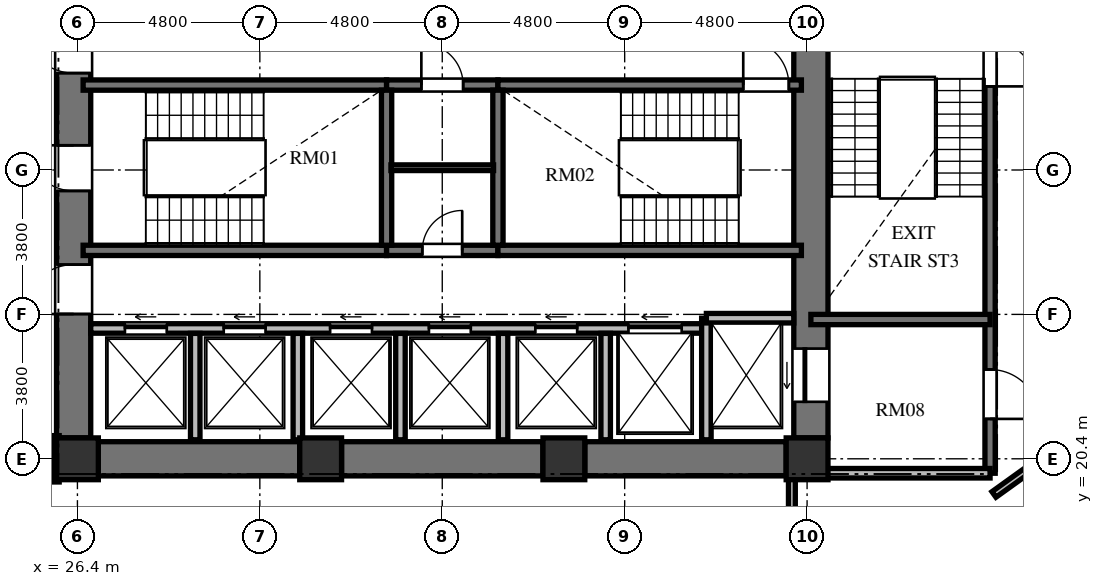
"""IFC4 building model, lengths in metres.
Left out: names, types, materials, properties, quantities, classifications, styles, units other than length and angle.
Written with IfcOpenShell. Run it as: python <this file> out.ifc"""

import sys

from ifc_helpers import new_model, si_unit, direction, frame, frame_2d, origin, origin_2d, place, context, subcontext, project, spatial, rectangle, extrude, element, fill, save


model = new_model("IFC4")
c1 = context("Model", 3, precision=1e-05, world=origin(), true_north=direction((0.0, 1.0)))
c2 = subcontext(c1, "Body", "Model", "MODEL_VIEW")
j1 = project(units=[si_unit("LENGTHUNIT", "METRE"), si_unit("PLANEANGLEUNIT", "RADIAN")], contexts=[c1])
p1 = place(None, origin())
s1 = spatial("IfcSite", under=j1, at=p1, CompositionType="ELEMENT")
p2 = place(p1, origin())
s2 = spatial("IfcBuilding", under=s1, at=p2, CompositionType="ELEMENT")
p3 = place(p2, frame((0.0, 0.0, 58.032)))
s3 = spatial("IfcBuildingStorey", under=s2, at=p3, CompositionType="ELEMENT", Elevation=58.032)
for number, where, z_axis, x_axis in (
    (1, (26.4, 20.4, 0.0), (0.0, 0.0, 1.0), (1.0, 0.0, 0.0)),
    (2, (32.8, 20.4, 0.0), (0.0, 0.0, 1.0), (1.0, 0.0, 0.0)),
    (3, (39.2, 20.4, 0.0), (0.0, 0.0, 1.0), (1.0, 0.0, 0.0)),
    (4, (45.6, 20.4, 0.0), (0.0, 0.0, 1.0), (1.0, 0.0, 0.0)),
):
    element("IfcColumn", number, at=place(p3, frame(where, z_axis=z_axis, x_axis=x_axis)), inside=s3, PredefinedType="COLUMN", context=c2, shape_type="SweptSolid", body=[
        extrude(rectangle(XDim=1.1, YDim=1.1, at=origin_2d()), origin(), (0.0, 0.0, 1.0), 3.648),
    ])
p4 = place(p3, frame((26.3, 20.95, 0.0), z_axis=(0.0, 0.0, 1.0), x_axis=(0.0, 1.0, 0.0)))
e5 = element("IfcWall", 5, at=p4, inside=s3, PredefinedType="SHEAR", context=c2, shape_type="SweptSolid", body=[
    extrude(rectangle(XDim=14.1, YDim=0.9, at=frame_2d((7.05, 0.0))), origin(), (0.0, 0.0, 1.0), 3.648),
])
p5 = place(p4, frame((6.5, 0.0, 0.0)))
e6 = element("IfcOpeningElement", 6, at=p5, cuts=e5, PredefinedType="OPENING", context=c2, shape_type="SweptSolid", body=[
    extrude(rectangle(XDim=1.2, YDim=2.15, at=frame_2d((0.6, 1.075))), frame((0.0, 0.46, 0.0), z_axis=(0.0, -1.0, 0.0), x_axis=(1.0, 0.0, 0.0)), (0.0, 0.0, 1.0), 0.92),
])
p6 = place(p4, frame((9.6, 0.0, 0.0)))
e7 = element("IfcOpeningElement", 7, at=p6, cuts=e5, PredefinedType="OPENING", context=c2, shape_type="SweptSolid", body=[
    extrude(rectangle(XDim=1.3, YDim=2.2, at=frame_2d((0.65, 1.1))), frame((0.0, 0.46, 0.0), z_axis=(0.0, -1.0, 0.0), x_axis=(1.0, 0.0, 0.0)), (0.0, 0.0, 1.0), 0.92),
])
p7 = place(p4, frame((3.26, 0.0, 0.0)))
e8 = element("IfcOpeningElement", 8, at=p7, cuts=e5, PredefinedType="OPENING", context=c2, shape_type="SweptSolid", body=[
    extrude(rectangle(XDim=1.3, YDim=2.2, at=frame_2d((0.65, 1.1))), frame((0.0, 0.46, 0.0), z_axis=(0.0, -1.0, 0.0), x_axis=(1.0, 0.0, 0.0)), (0.0, 0.0, 1.0), 0.92),
])
p8 = place(p3, frame((45.7, 20.95, 0.0), z_axis=(0.0, 0.0, 1.0), x_axis=(0.0, 1.0, 0.0)))
e9 = element("IfcWall", 9, at=p8, inside=s3, PredefinedType="SHEAR", context=c2, shape_type="SweptSolid", body=[
    extrude(rectangle(XDim=14.1, YDim=0.9, at=frame_2d((7.05, 0.0))), origin(), (0.0, 0.0, 1.0), 3.648),
])
p9 = place(p8, frame((11.75, 0.0, 0.0)))
e10 = element("IfcOpeningElement", 10, at=p9, cuts=e9, PredefinedType="OPENING", context=c2, shape_type="SweptSolid", body=[
    extrude(rectangle(XDim=1.4, YDim=2.3, at=frame_2d((0.7, 1.15))), frame((0.0, 0.46, 0.0), z_axis=(0.0, -1.0, 0.0), x_axis=(1.0, 0.0, 0.0)), (0.0, 0.0, 1.0), 0.92),
])
p10 = place(p8, frame((0.95, 0.0, 0.0)))
e11 = element("IfcOpeningElement", 11, at=p10, cuts=e9, PredefinedType="OPENING", context=c2, shape_type="SweptSolid", body=[
    extrude(rectangle(XDim=1.4, YDim=2.3, at=frame_2d((0.7, 1.15))), frame((0.0, 0.46, 0.0), z_axis=(0.0, -1.0, 0.0), x_axis=(1.0, 0.0, 0.0)), (0.0, 0.0, 1.0), 0.92),
])
p11 = place(p3, frame((26.95, 20.4, 0.0), z_axis=(0.0, 0.0, 1.0), x_axis=(1.0, 0.0, 0.0)))
e12 = element("IfcWall", 12, at=p11, inside=s3, PredefinedType="SHEAR", context=c2, shape_type="SweptSolid", body=[
    extrude(rectangle(XDim=5.3, YDim=0.9, at=frame_2d((2.65, 0.0))), origin(), (0.0, 0.0, 1.0), 3.648),
])
p12 = place(p3, frame((33.35, 20.4, 0.0), z_axis=(0.0, 0.0, 1.0), x_axis=(1.0, 0.0, 0.0)))
e13 = element("IfcWall", 13, at=p12, inside=s3, PredefinedType="SHEAR", context=c2, shape_type="SweptSolid", body=[
    extrude(rectangle(XDim=5.3, YDim=0.9, at=frame_2d((2.65, 0.0))), origin(), (0.0, 0.0, 1.0), 3.648),
])
p13 = place(p3, frame((39.75, 20.4, 0.0), z_axis=(0.0, 0.0, 1.0), x_axis=(1.0, 0.0, 0.0)))
e14 = element("IfcWall", 14, at=p13, inside=s3, PredefinedType="SHEAR", context=c2, shape_type="SweptSolid", body=[
    extrude(rectangle(XDim=5.3, YDim=0.9, at=frame_2d((2.65, 0.0))), origin(), (0.0, 0.0, 1.0), 3.648),
])
p14 = place(p3, frame((26.55, 30.235, 0.0), z_axis=(0.0, 0.0, 1.0), x_axis=(1.0, 0.0, 0.0)))
e15 = element("IfcWall", 15, at=p14, inside=s3, PredefinedType="SHEAR", context=c2, shape_type="SweptSolid", body=[
    extrude(rectangle(XDim=7.985, YDim=0.27, at=frame_2d((3.992, 0.0))), origin(), (0.0, 0.0, 1.0), 3.648),
])
p15 = place(p3, frame((34.535, 30.235, 0.0), z_axis=(0.0, 0.0, 1.0), x_axis=(1.0, 0.0, 0.0)))
e16 = element("IfcWall", 16, at=p15, inside=s3, PredefinedType="SHEAR", context=c2, shape_type="SweptSolid", body=[
    extrude(rectangle(XDim=2.93, YDim=0.27, at=frame_2d((1.465, 0.0))), origin(), (0.0, 0.0, 1.0), 3.648),
])
p16 = place(p15, frame((0.915, 0.0, 0.0)))
e17 = element("IfcOpeningElement", 17, at=p16, cuts=e16, PredefinedType="OPENING", context=c2, shape_type="SweptSolid", body=[
    extrude(rectangle(XDim=1.1, YDim=2.15, at=frame_2d((0.55, 1.075))), frame((0.0, 0.145, 0.0), z_axis=(0.0, -1.0, 0.0), x_axis=(1.0, 0.0, 0.0)), (0.0, 0.0, 1.0), 0.29),
])
p17 = place(p3, frame((37.465, 30.235, 0.0), z_axis=(0.0, 0.0, 1.0), x_axis=(1.0, 0.0, 0.0)))
e18 = element("IfcWall", 18, at=p17, inside=s3, PredefinedType="SHEAR", context=c2, shape_type="SweptSolid", body=[
    extrude(rectangle(XDim=7.985, YDim=0.27, at=frame_2d((3.992, 0.0))), origin(), (0.0, 0.0, 1.0), 3.648),
])
p18 = place(p17, frame((6.455, 0.0, 0.0)))
e19 = element("IfcOpeningElement", 19, at=p18, cuts=e18, PredefinedType="OPENING", context=c2, shape_type="SweptSolid", body=[
    extrude(rectangle(XDim=1.2, YDim=2.15, at=frame_2d((0.6, 1.075))), frame((0.0, 0.145, 0.0), z_axis=(0.0, -1.0, 0.0), x_axis=(1.0, 0.0, 0.0)), (0.0, 0.0, 1.0), 0.29),
])
p19 = place(p3, frame((26.55, 25.885, 0.0), z_axis=(0.0, 0.0, 1.0), x_axis=(1.0, 0.0, 0.0)))
e20 = element("IfcWall", 20, at=p19, inside=s3, PredefinedType="SHEAR", context=c2, shape_type="SweptSolid", body=[
    extrude(rectangle(XDim=7.985, YDim=0.27, at=frame_2d((3.992, 0.0))), origin(), (0.0, 0.0, 1.0), 3.648),
])
p20 = place(p3, frame((34.535, 25.885, 0.0), z_axis=(0.0, 0.0, 1.0), x_axis=(1.0, 0.0, 0.0)))
e21 = element("IfcWall", 21, at=p20, inside=s3, PredefinedType="SHEAR", context=c2, shape_type="SweptSolid", body=[
    extrude(rectangle(XDim=2.93, YDim=0.27, at=frame_2d((1.465, 0.0))), origin(), (0.0, 0.0, 1.0), 3.648),
])
p21 = place(p20, frame((0.94, 0.0, 0.0)))
e22 = element("IfcOpeningElement", 22, at=p21, cuts=e21, PredefinedType="OPENING", context=c2, shape_type="SweptSolid", body=[
    extrude(rectangle(XDim=1.05, YDim=2.15, at=frame_2d((0.525, 1.075))), frame((0.0, 0.145, 0.0), z_axis=(0.0, -1.0, 0.0), x_axis=(1.0, 0.0, 0.0)), (0.0, 0.0, 1.0), 0.29),
])
p22 = place(p3, frame((37.465, 25.885, 0.0), z_axis=(0.0, 0.0, 1.0), x_axis=(1.0, 0.0, 0.0)))
e23 = element("IfcWall", 23, at=p22, inside=s3, PredefinedType="SHEAR", context=c2, shape_type="SweptSolid", body=[
    extrude(rectangle(XDim=7.985, YDim=0.27, at=frame_2d((3.992, 0.0))), origin(), (0.0, 0.0, 1.0), 3.648),
])
for number, where, z_axis, x_axis in (
    (24, (34.535, 26.02, 0.0), (0.0, 0.0, 1.0), (0.0, 1.0, 0.0)),
    (25, (37.465, 26.02, 0.0), (0.0, 0.0, 1.0), (0.0, 1.0, 0.0)),
):
    element("IfcWall", number, at=place(p3, frame(where, z_axis=z_axis, x_axis=x_axis)), inside=s3, PredefinedType="SHEAR", context=c2, shape_type="SweptSolid", body=[
        extrude(rectangle(XDim=4.08, YDim=0.27, at=frame_2d((2.04, 0.0))), origin(), (0.0, 0.0, 1.0), 3.648),
    ])
p23 = place(p3, frame((34.65, 28.06, 0.0), z_axis=(0.0, 0.0, 1.0), x_axis=(1.0, 0.0, 0.0)))
e26 = element("IfcWall", 26, at=p23, inside=s3, PredefinedType="PARTITIONING", context=c2, shape_type="SweptSolid", body=[
    extrude(rectangle(XDim=2.7, YDim=0.15, at=frame_2d((1.35, 0.0))), origin(), (0.0, 0.0, 1.0), 3.428),
])
p24 = place(p3, frame((26.75, 23.83, 0.0), z_axis=(0.0, 0.0, 1.0), x_axis=(1.0, 0.0, 0.0)))
e27 = element("IfcWall", 27, at=p24, inside=s3, PredefinedType="SOLIDWALL", context=c2, shape_type="SweptSolid", body=[
    extrude(rectangle(XDim=16.2, YDim=0.25, at=frame_2d((8.1, 0.0))), origin(), (0.0, 0.0, 1.0), 3.428),
])
p25 = place(p24, frame((0.9, 0.0, 0.0)))
e28 = element("IfcOpeningElement", 28, at=p25, cuts=e27, PredefinedType="OPENING", context=c2, shape_type="SweptSolid", body=[
    extrude(rectangle(XDim=1.1, YDim=2.2, at=frame_2d((0.55, 1.1))), frame((0.0, 0.135, 0.0), z_axis=(0.0, -1.0, 0.0), x_axis=(1.0, 0.0, 0.0)), (0.0, 0.0, 1.0), 0.27),
])
p26 = place(p24, frame((3.5, 0.0, 0.0)))
e29 = element("IfcOpeningElement", 29, at=p26, cuts=e27, PredefinedType="OPENING", context=c2, shape_type="SweptSolid", body=[
    extrude(rectangle(XDim=1.1, YDim=2.2, at=frame_2d((0.55, 1.1))), frame((0.0, 0.135, 0.0), z_axis=(0.0, -1.0, 0.0), x_axis=(1.0, 0.0, 0.0)), (0.0, 0.0, 1.0), 0.27),
])
p27 = place(p24, frame((6.3, 0.0, 0.0)))
e30 = element("IfcOpeningElement", 30, at=p27, cuts=e27, PredefinedType="OPENING", context=c2, shape_type="SweptSolid", body=[
    extrude(rectangle(XDim=1.1, YDim=2.2, at=frame_2d((0.55, 1.1))), frame((0.0, 0.135, 0.0), z_axis=(0.0, -1.0, 0.0), x_axis=(1.0, 0.0, 0.0)), (0.0, 0.0, 1.0), 0.27),
])
p28 = place(p24, frame((8.9, 0.0, 0.0)))
e31 = element("IfcOpeningElement", 31, at=p28, cuts=e27, PredefinedType="OPENING", context=c2, shape_type="SweptSolid", body=[
    extrude(rectangle(XDim=1.1, YDim=2.2, at=frame_2d((0.55, 1.1))), frame((0.0, 0.135, 0.0), z_axis=(0.0, -1.0, 0.0), x_axis=(1.0, 0.0, 0.0)), (0.0, 0.0, 1.0), 0.27),
])
p29 = place(p24, frame((11.7, 0.0, 0.0)))
e32 = element("IfcOpeningElement", 32, at=p29, cuts=e27, PredefinedType="OPENING", context=c2, shape_type="SweptSolid", body=[
    extrude(rectangle(XDim=1.1, YDim=2.2, at=frame_2d((0.55, 1.1))), frame((0.0, 0.135, 0.0), z_axis=(0.0, -1.0, 0.0), x_axis=(1.0, 0.0, 0.0)), (0.0, 0.0, 1.0), 0.27),
])
p30 = place(p24, frame((14.15, 0.0, 0.0)))
e33 = element("IfcOpeningElement", 33, at=p30, cuts=e27, PredefinedType="OPENING", context=c2, shape_type="SweptSolid", body=[
    extrude(rectangle(XDim=1.4, YDim=2.3, at=frame_2d((0.7, 1.15))), frame((0.0, 0.135, 0.0), z_axis=(0.0, -1.0, 0.0), x_axis=(1.0, 0.0, 0.0)), (0.0, 0.0, 1.0), 0.27),
])
p31 = place(p3, frame((42.95, 20.9, 0.0), z_axis=(0.0, 0.0, 1.0), x_axis=(0.0, 1.0, 0.0)))
e34 = element("IfcWall", 34, at=p31, inside=s3, PredefinedType="SOLIDWALL", context=c2, shape_type="SweptSolid", body=[
    extrude(rectangle(XDim=3.2, YDim=0.25, at=frame_2d((1.6, 0.0))), origin(), (0.0, 0.0, 1.0), 3.428),
])
p32 = place(p3, frame((42.95, 24.1, 0.0), z_axis=(0.0, 0.0, 1.0), x_axis=(1.0, 0.0, 0.0)))
e35 = element("IfcWall", 35, at=p32, inside=s3, PredefinedType="SOLIDWALL", context=c2, shape_type="SweptSolid", body=[
    extrude(rectangle(XDim=2.3, YDim=0.25, at=frame_2d((1.15, 0.0))), origin(), (0.0, 0.0, 1.0), 3.428),
])
for number, where, z_axis, x_axis in (
    (36, (29.5, 20.9, 0.0), (0.0, 0.0, 1.0), (0.0, 1.0, 0.0)),
    (37, (32.2, 20.9, 0.0), (0.0, 0.0, 1.0), (0.0, 1.0, 0.0)),
    (38, (34.9, 20.9, 0.0), (0.0, 0.0, 1.0), (0.0, 1.0, 0.0)),
    (39, (37.6, 20.9, 0.0), (0.0, 0.0, 1.0), (0.0, 1.0, 0.0)),
    (40, (40.3, 20.9, 0.0), (0.0, 0.0, 1.0), (0.0, 1.0, 0.0)),
):
    element("IfcWall", number, at=place(p3, frame(where, z_axis=z_axis, x_axis=x_axis)), inside=s3, PredefinedType="SOLIDWALL", context=c2, shape_type="SweptSolid", body=[
        extrude(rectangle(XDim=2.8, YDim=0.25, at=frame_2d((1.4, 0.0))), origin(), (0.0, 0.0, 1.0), 3.428),
    ])
p33 = place(p3, frame((50.415, 35.845, 0.0), z_axis=(0.0, 0.0, 1.0), x_axis=(0.0, -1.0, 0.0)))
e41 = element("IfcWall", 41, at=p33, inside=s3, PredefinedType="SHEAR", context=c2, shape_type="SweptSolid", body=[
    extrude(rectangle(XDim=15.825, YDim=0.27, at=frame_2d((7.913, 0.0))), origin(), (0.0, 0.0, 1.0), 3.648),
])
p34 = place(p33, frame((4.445, 0.0, 0.0)))
e42 = element("IfcOpeningElement", 42, at=p34, cuts=e41, PredefinedType="OPENING", context=c2, shape_type="SweptSolid", body=[
    extrude(rectangle(XDim=1.2, YDim=2.15, at=frame_2d((0.6, 1.075))), frame((0.0, 0.145, 0.0), z_axis=(0.0, -1.0, 0.0), x_axis=(1.0, 0.0, 0.0)), (0.0, 0.0, 1.0), 0.29),
])
p35 = place(p33, frame((1.295, 0.0, 0.0)))
e43 = element("IfcOpeningElement", 43, at=p35, cuts=e41, PredefinedType="OPENING", context=c2, shape_type="SweptSolid", body=[
    extrude(rectangle(XDim=1.3, YDim=2.2, at=frame_2d((0.65, 1.1))), frame((0.0, 0.145, 0.0), z_axis=(0.0, -1.0, 0.0), x_axis=(1.0, 0.0, 0.0)), (0.0, 0.0, 1.0), 0.29),
])
p36 = place(p33, frame((13.095, 0.0, 0.0)))
e44 = element("IfcOpeningElement", 44, at=p36, cuts=e41, PredefinedType="OPENING", context=c2, shape_type="SweptSolid", body=[
    extrude(rectangle(XDim=1.3, YDim=2.2, at=frame_2d((0.65, 1.1))), frame((0.0, 0.145, 0.0), z_axis=(0.0, -1.0, 0.0), x_axis=(1.0, 0.0, 0.0)), (0.0, 0.0, 1.0), 0.29),
])
p37 = place(p3, frame((45.7, 24.065, 0.0), z_axis=(0.0, 0.0, 1.0), x_axis=(1.0, 0.0, 0.0)))
e45 = element("IfcWall", 45, at=p37, inside=s3, PredefinedType="SHEAR", context=c2, shape_type="SweptSolid", body=[
    extrude(rectangle(XDim=4.715, YDim=0.27, at=frame_2d((2.357, 0.0))), origin(), (0.0, 0.0, 1.0), 3.648),
])
p38 = place(p3, frame((45.7, 20.02, 0.0), z_axis=(0.0, 0.0, 1.0), x_axis=(1.0, 0.0, 0.0)))
e46 = element("IfcWall", 46, at=p38, inside=s3, PredefinedType="SOLIDWALL", context=c2, shape_type="SweptSolid", body=[
    extrude(rectangle(XDim=4.715, YDim=0.25, at=frame_2d((2.357, 0.0))), origin(), (0.0, 0.0, 1.0), 3.428),
])
p39 = place(p3, frame((53.183, 21.376, 0.0), z_axis=(0.0, 0.0, 1.0), x_axis=(-0.812151980909, -0.583445935717, 0.0)))
e47 = element("IfcWall", 47, at=p39, inside=s3, PredefinedType="PARTITIONING", context=c2, shape_type="SweptSolid", body=[
    extrude(rectangle(XDim=3.281, YDim=0.18, at=frame_2d((1.641, 0.0))), origin(), (0.0, 0.0, 1.0), 3.428),
])
p40 = place(p3, frame((25.83, 21.01, 0.0), z_axis=(0.0, 0.0, 1.0), x_axis=(0.0, -1.0, 0.0)))
e48 = element("IfcWall", 48, at=p40, inside=s3, PredefinedType="PARTITIONING", context=c2, shape_type="SweptSolid", body=[
    extrude(rectangle(XDim=1.22, YDim=0.18, at=frame_2d((0.61, 0.0))), origin(), (0.0, 0.0, 1.0), 3.428),
])
p41 = place(p3, frame((45.2, 19.91, 0.0), z_axis=(0.0, 0.0, 1.0), x_axis=(0.0, -1.0, 0.0)))
e49 = element("IfcWall", 49, at=p41, inside=s3, PredefinedType="PARTITIONING", context=c2, shape_type="SweptSolid", body=[
    extrude(rectangle(XDim=2.55, YDim=0.18, at=frame_2d((1.275, 0.0))), origin(), (0.0, 0.0, 1.0), 3.428),
])
p42 = place(p5, origin())
e50 = element("IfcDoor", 50, at=p42, inside=s3, OperationType="SINGLE_SWING_RIGHT", PredefinedType="DOOR", context=c2, shape_type="SweptSolid", body=[
    extrude(rectangle(XDim=1.2, YDim=2.15, at=frame_2d((0.6, 1.075))), frame((0.0, 0.025, 0.0), z_axis=(0.0, -1.0, 0.0), x_axis=(1.0, 0.0, 0.0)), (0.0, 0.0, 1.0), 0.05),
])
fill(e6, e50)
p43 = place(p18, origin())
e51 = element("IfcDoor", 51, at=p43, inside=s3, OperationType="SINGLE_SWING_LEFT", PredefinedType="DOOR", context=c2, shape_type="SweptSolid", body=[
    extrude(rectangle(XDim=1.2, YDim=2.15, at=frame_2d((0.6, 1.075))), frame((0.0, 0.025, 0.0), z_axis=(0.0, -1.0, 0.0), x_axis=(1.0, 0.0, 0.0)), (0.0, 0.0, 1.0), 0.05),
])
fill(e19, e51)
p44 = place(p21, origin())
e52 = element("IfcDoor", 52, at=p44, inside=s3, OperationType="SINGLE_SWING_RIGHT", PredefinedType="DOOR", context=c2, shape_type="SweptSolid", body=[
    extrude(rectangle(XDim=1.05, YDim=2.15, at=frame_2d((0.525, 1.075))), frame((0.0, 0.025, 0.0), z_axis=(0.0, -1.0, 0.0), x_axis=(1.0, 0.0, 0.0)), (0.0, 0.0, 1.0), 0.05),
])
fill(e22, e52)
p45 = place(p16, origin())
e53 = element("IfcDoor", 53, at=p45, inside=s3, OperationType="SINGLE_SWING_LEFT", PredefinedType="DOOR", context=c2, shape_type="SweptSolid", body=[
    extrude(rectangle(XDim=1.1, YDim=2.15, at=frame_2d((0.55, 1.075))), frame((0.0, 0.025, 0.0), z_axis=(0.0, -1.0, 0.0), x_axis=(1.0, 0.0, 0.0)), (0.0, 0.0, 1.0), 0.05),
])
fill(e17, e53)
p46 = place(p6, origin())
e54 = element("IfcDoor", 54, at=p46, inside=s3, OperationType="SINGLE_SWING_RIGHT", PredefinedType="DOOR", context=c2, shape_type="SweptSolid", body=[
    extrude(rectangle(XDim=1.3, YDim=2.2, at=frame_2d((0.65, 1.1))), frame((0.0, 0.025, 0.0), z_axis=(0.0, -1.0, 0.0), x_axis=(1.0, 0.0, 0.0)), (0.0, 0.0, 1.0), 0.05),
])
fill(e7, e54)
p47 = place(p7, origin())
e55 = element("IfcDoor", 55, at=p47, inside=s3, OperationType="SINGLE_SWING_LEFT", PredefinedType="DOOR", context=c2, shape_type="SweptSolid", body=[
    extrude(rectangle(XDim=1.3, YDim=2.2, at=frame_2d((0.65, 1.1))), frame((0.0, 0.025, 0.0), z_axis=(0.0, -1.0, 0.0), x_axis=(1.0, 0.0, 0.0)), (0.0, 0.0, 1.0), 0.05),
])
fill(e8, e55)
p48 = place(p25, origin())
e56 = element("IfcDoor", 56, at=p48, inside=s3, OperationType="SLIDING_TO_LEFT", PredefinedType="DOOR", context=c2, shape_type="SweptSolid", body=[
    extrude(rectangle(XDim=1.1, YDim=2.2, at=frame_2d((0.55, 1.1))), frame((0.0, 0.025, 0.0), z_axis=(0.0, -1.0, 0.0), x_axis=(1.0, 0.0, 0.0)), (0.0, 0.0, 1.0), 0.05),
])
fill(e28, e56)
p49 = place(p26, origin())
e57 = element("IfcDoor", 57, at=p49, inside=s3, OperationType="SLIDING_TO_LEFT", PredefinedType="DOOR", context=c2, shape_type="SweptSolid", body=[
    extrude(rectangle(XDim=1.1, YDim=2.2, at=frame_2d((0.55, 1.1))), frame((0.0, 0.025, 0.0), z_axis=(0.0, -1.0, 0.0), x_axis=(1.0, 0.0, 0.0)), (0.0, 0.0, 1.0), 0.05),
])
fill(e29, e57)
p50 = place(p27, origin())
e58 = element("IfcDoor", 58, at=p50, inside=s3, OperationType="SLIDING_TO_LEFT", PredefinedType="DOOR", context=c2, shape_type="SweptSolid", body=[
    extrude(rectangle(XDim=1.1, YDim=2.2, at=frame_2d((0.55, 1.1))), frame((0.0, 0.025, 0.0), z_axis=(0.0, -1.0, 0.0), x_axis=(1.0, 0.0, 0.0)), (0.0, 0.0, 1.0), 0.05),
])
fill(e30, e58)
p51 = place(p28, origin())
e59 = element("IfcDoor", 59, at=p51, inside=s3, OperationType="SLIDING_TO_LEFT", PredefinedType="DOOR", context=c2, shape_type="SweptSolid", body=[
    extrude(rectangle(XDim=1.1, YDim=2.2, at=frame_2d((0.55, 1.1))), frame((0.0, 0.025, 0.0), z_axis=(0.0, -1.0, 0.0), x_axis=(1.0, 0.0, 0.0)), (0.0, 0.0, 1.0), 0.05),
])
fill(e31, e59)
p52 = place(p29, origin())
e60 = element("IfcDoor", 60, at=p52, inside=s3, OperationType="SLIDING_TO_LEFT", PredefinedType="DOOR", context=c2, shape_type="SweptSolid", body=[
    extrude(rectangle(XDim=1.1, YDim=2.2, at=frame_2d((0.55, 1.1))), frame((0.0, 0.025, 0.0), z_axis=(0.0, -1.0, 0.0), x_axis=(1.0, 0.0, 0.0)), (0.0, 0.0, 1.0), 0.05),
])
fill(e32, e60)
p53 = place(p10, origin())
e61 = element("IfcDoor", 61, at=p53, inside=s3, OperationType="SLIDING_TO_LEFT", PredefinedType="DOOR", context=c2, shape_type="SweptSolid", body=[
    extrude(rectangle(XDim=1.4, YDim=2.3, at=frame_2d((0.7, 1.15))), frame((0.0, 0.025, 0.0), z_axis=(0.0, -1.0, 0.0), x_axis=(1.0, 0.0, 0.0)), (0.0, 0.0, 1.0), 0.05),
])
fill(e11, e61)
p54 = place(p30, origin())
e62 = element("IfcDoor", 62, at=p54, inside=s3, OperationType="SLIDING_TO_LEFT", PredefinedType="DOOR", context=c2, shape_type="SweptSolid", body=[
    extrude(rectangle(XDim=1.4, YDim=2.3, at=frame_2d((0.7, 1.15))), frame((0.0, 0.025, 0.0), z_axis=(0.0, -1.0, 0.0), x_axis=(1.0, 0.0, 0.0)), (0.0, 0.0, 1.0), 0.05),
])
fill(e33, e62)
p55 = place(p34, origin())
e63 = element("IfcDoor", 63, at=p55, inside=s3, OperationType="SINGLE_SWING_RIGHT", PredefinedType="DOOR", context=c2, shape_type="SweptSolid", body=[
    extrude(rectangle(XDim=1.2, YDim=2.15, at=frame_2d((0.6, 1.075))), frame((0.0, 0.025, 0.0), z_axis=(0.0, -1.0, 0.0), x_axis=(1.0, 0.0, 0.0)), (0.0, 0.0, 1.0), 0.05),
])
fill(e42, e63)
p56 = place(p36, origin())
e64 = element("IfcDoor", 64, at=p56, inside=s3, OperationType="SINGLE_SWING_RIGHT", PredefinedType="DOOR", context=c2, shape_type="SweptSolid", body=[
    extrude(rectangle(XDim=1.3, YDim=2.2, at=frame_2d((0.65, 1.1))), frame((0.0, 0.025, 0.0), z_axis=(0.0, -1.0, 0.0), x_axis=(1.0, 0.0, 0.0)), (0.0, 0.0, 1.0), 0.05),
])
fill(e44, e64)
save(model, sys.argv[1])
